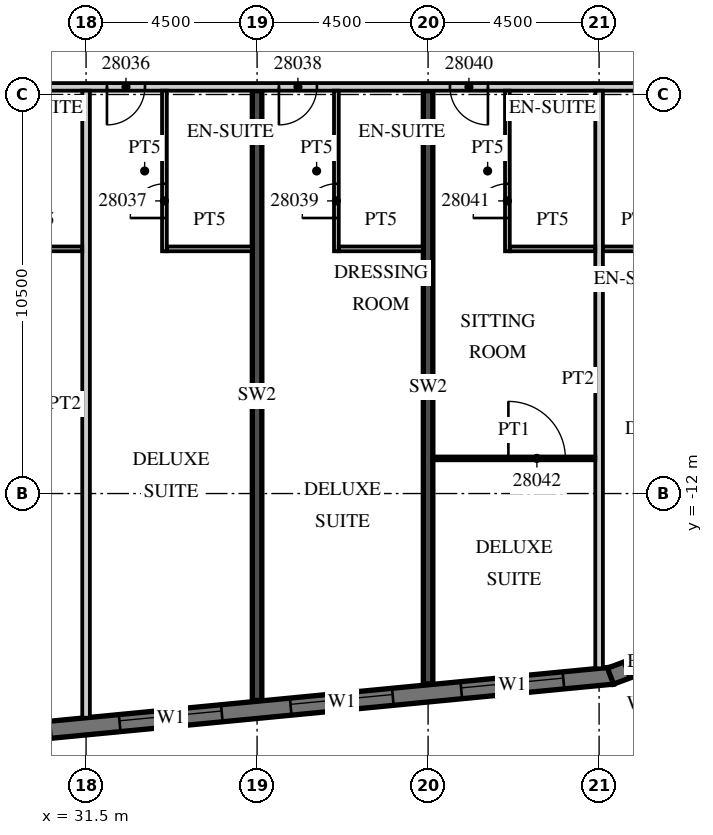
"""IFC4 building model, lengths in metres.
Left out: names, types, materials, properties, quantities, classifications, styles, units other than length and angle.
Written with IfcOpenShell. Run it as: python <this file> out.ifc"""

import sys

from ifc_helpers import new_model, si_unit, direction, frame, frame_2d, origin, place, context, subcontext, project, spatial, polyline, rectangle, outline, extrude, element, fill, save


model = new_model("IFC4")
c1 = context("Model", 3, precision=1e-05, world=origin(), true_north=direction((0.0, 1.0)))
c2 = subcontext(c1, "Body", "Model", "MODEL_VIEW")
j1 = project(units=[si_unit("LENGTHUNIT", "METRE"), si_unit("PLANEANGLEUNIT", "RADIAN")], contexts=[c1])
p1 = place(None, origin())
s1 = spatial("IfcSite", under=j1, at=p1, CompositionType="ELEMENT")
p2 = place(p1, origin())
s2 = spatial("IfcBuilding", under=s1, at=p2, CompositionType="ELEMENT")
p3 = place(p2, frame((0.0, 0.0, 127.3)))
s3 = spatial("IfcBuildingStorey", under=s2, at=p3, CompositionType="ELEMENT", Elevation=127.3)
p4 = place(p3, frame((36.0, -17.444, 0.0), z_axis=(0.0, 0.0, 1.0), x_axis=(0.0, 1.0, 0.0)))
e1 = element("IfcWall", 1, at=p4, inside=s3, PredefinedType="SHEAR", context=c2, shape_type="SweptSolid", body=[
    extrude(rectangle(XDim=16.044, YDim=0.25, at=frame_2d((8.022, 0.0))), origin(), (0.0, 0.0, 1.0), 3.3),
])
p5 = place(p3, frame((40.5, -17.011, 0.0), z_axis=(0.0, 0.0, 1.0), x_axis=(0.0, 1.0, 0.0)))
e2 = element("IfcWall", 2, at=p5, inside=s3, PredefinedType="SHEAR", context=c2, shape_type="SweptSolid", body=[
    extrude(rectangle(XDim=15.611, YDim=0.25, at=frame_2d((7.805, 0.0))), origin(), (0.0, 0.0, 1.0), 3.3),
])
p6 = place(p3, frame((-13.521, -22.46, 0.0), z_axis=(0.0, 0.0, 1.0), x_axis=(0.995396096335, 0.095846812164, 0.0)))
e3 = element("IfcWall", 3, at=p6, inside=s3, PredefinedType="SOLIDWALL", context=c2, shape_type="SweptSolid", body=[
    extrude(rectangle(XDim=59.151, YDim=0.45, at=frame_2d((29.575, 0.0))), origin(), (0.0, 0.0, 1.0), 3.02),
])
p7 = place(p6, frame((0.91, 0.0, 0.45)))
e4 = element("IfcOpeningElement", 4, at=p7, cuts=e3, PredefinedType="OPENING", context=c2, shape_type="SweptSolid", body=[
    extrude(rectangle(XDim=2.7, YDim=2.25, at=frame_2d((1.35, 1.125))), frame((0.0, 0.235, 0.0), z_axis=(0.0, -1.0, 0.0), x_axis=(1.0, 0.0, 0.0)), (0.0, 0.0, 1.0), 0.47),
])
p8 = place(p6, frame((5.431, 0.0, 0.45)))
e5 = element("IfcOpeningElement", 5, at=p8, cuts=e3, PredefinedType="OPENING", context=c2, shape_type="SweptSolid", body=[
    extrude(rectangle(XDim=2.7, YDim=2.25, at=frame_2d((1.35, 1.125))), frame((0.0, 0.235, 0.0), z_axis=(0.0, -1.0, 0.0), x_axis=(1.0, 0.0, 0.0)), (0.0, 0.0, 1.0), 0.47),
])
p9 = place(p6, frame((9.952, 0.0, 0.45)))
e6 = element("IfcOpeningElement", 6, at=p9, cuts=e3, PredefinedType="OPENING", context=c2, shape_type="SweptSolid", body=[
    extrude(rectangle(XDim=2.7, YDim=2.25, at=frame_2d((1.35, 1.125))), frame((0.0, 0.235, 0.0), z_axis=(0.0, -1.0, 0.0), x_axis=(1.0, 0.0, 0.0)), (0.0, 0.0, 1.0), 0.47),
])
p10 = place(p6, frame((14.473, 0.0, 0.45)))
e7 = element("IfcOpeningElement", 7, at=p10, cuts=e3, PredefinedType="OPENING", context=c2, shape_type="SweptSolid", body=[
    extrude(rectangle(XDim=2.7, YDim=2.25, at=frame_2d((1.35, 1.125))), frame((0.0, 0.235, 0.0), z_axis=(0.0, -1.0, 0.0), x_axis=(1.0, 0.0, 0.0)), (0.0, 0.0, 1.0), 0.47),
])
p11 = place(p6, frame((18.994, 0.0, 0.45)))
e8 = element("IfcOpeningElement", 8, at=p11, cuts=e3, PredefinedType="OPENING", context=c2, shape_type="SweptSolid", body=[
    extrude(rectangle(XDim=2.7, YDim=2.25, at=frame_2d((1.35, 1.125))), frame((0.0, 0.235, 0.0), z_axis=(0.0, -1.0, 0.0), x_axis=(1.0, 0.0, 0.0)), (0.0, 0.0, 1.0), 0.47),
])
p12 = place(p6, frame((23.514, 0.0, 0.45)))
e9 = element("IfcOpeningElement", 9, at=p12, cuts=e3, PredefinedType="OPENING", context=c2, shape_type="SweptSolid", body=[
    extrude(rectangle(XDim=2.7, YDim=2.25, at=frame_2d((1.35, 1.125))), frame((0.0, 0.235, 0.0), z_axis=(0.0, -1.0, 0.0), x_axis=(1.0, 0.0, 0.0)), (0.0, 0.0, 1.0), 0.47),
])
p13 = place(p6, frame((28.035, 0.0, 0.45)))
e10 = element("IfcOpeningElement", 10, at=p13, cuts=e3, PredefinedType="OPENING", context=c2, shape_type="SweptSolid", body=[
    extrude(rectangle(XDim=2.7, YDim=2.25, at=frame_2d((1.35, 1.125))), frame((0.0, 0.235, 0.0), z_axis=(0.0, -1.0, 0.0), x_axis=(1.0, 0.0, 0.0)), (0.0, 0.0, 1.0), 0.47),
])
p14 = place(p6, frame((32.556, 0.0, 0.45)))
e11 = element("IfcOpeningElement", 11, at=p14, cuts=e3, PredefinedType="OPENING", context=c2, shape_type="SweptSolid", body=[
    extrude(rectangle(XDim=2.7, YDim=2.25, at=frame_2d((1.35, 1.125))), frame((0.0, 0.235, 0.0), z_axis=(0.0, -1.0, 0.0), x_axis=(1.0, 0.0, 0.0)), (0.0, 0.0, 1.0), 0.47),
])
p15 = place(p6, frame((37.077, 0.0, 0.45)))
e12 = element("IfcOpeningElement", 12, at=p15, cuts=e3, PredefinedType="OPENING", context=c2, shape_type="SweptSolid", body=[
    extrude(rectangle(XDim=2.7, YDim=2.25, at=frame_2d((1.35, 1.125))), frame((0.0, 0.235, 0.0), z_axis=(0.0, -1.0, 0.0), x_axis=(1.0, 0.0, 0.0)), (0.0, 0.0, 1.0), 0.47),
])
p16 = place(p6, frame((41.598, 0.0, 0.45)))
e13 = element("IfcOpeningElement", 13, at=p16, cuts=e3, PredefinedType="OPENING", context=c2, shape_type="SweptSolid", body=[
    extrude(rectangle(XDim=2.7, YDim=2.25, at=frame_2d((1.35, 1.125))), frame((0.0, 0.235, 0.0), z_axis=(0.0, -1.0, 0.0), x_axis=(1.0, 0.0, 0.0)), (0.0, 0.0, 1.0), 0.47),
])
p17 = place(p6, frame((46.118, 0.0, 0.45)))
e14 = element("IfcOpeningElement", 14, at=p17, cuts=e3, PredefinedType="OPENING", context=c2, shape_type="SweptSolid", body=[
    extrude(rectangle(XDim=2.7, YDim=2.25, at=frame_2d((1.35, 1.125))), frame((0.0, 0.235, 0.0), z_axis=(0.0, -1.0, 0.0), x_axis=(1.0, 0.0, 0.0)), (0.0, 0.0, 1.0), 0.47),
])
p18 = place(p6, frame((50.639, 0.0, 0.45)))
e15 = element("IfcOpeningElement", 15, at=p18, cuts=e3, PredefinedType="OPENING", context=c2, shape_type="SweptSolid", body=[
    extrude(rectangle(XDim=2.7, YDim=2.25, at=frame_2d((1.35, 1.125))), frame((0.0, 0.235, 0.0), z_axis=(0.0, -1.0, 0.0), x_axis=(1.0, 0.0, 0.0)), (0.0, 0.0, 1.0), 0.47),
])
p19 = place(p6, frame((55.15, 0.0, 0.45)))
e16 = element("IfcOpeningElement", 16, at=p19, cuts=e3, PredefinedType="OPENING", context=c2, shape_type="SweptSolid", body=[
    extrude(rectangle(XDim=2.7, YDim=2.25, at=frame_2d((1.35, 1.125))), frame((0.0, 0.235, 0.0), z_axis=(0.0, -1.0, 0.0), x_axis=(1.0, 0.0, 0.0)), (0.0, 0.0, 1.0), 0.47),
])
p20 = place(p3, frame((45.3, -16.804, 0.0), z_axis=(0.0, 0.0, 1.0), x_axis=(0.936677599948, 0.350192909346, 0.0)))
e17 = element("IfcWall", 17, at=p20, inside=s3, PredefinedType="SOLIDWALL", context=c2, shape_type="SweptSolid", body=[
    extrude(outline(polyline([(0.0, -0.225), (2.071, -0.225), (1.95, 0.225), (0.121, 0.225), (0.0, -0.225)])), origin(), (0.0, 0.0, 1.0), 3.02),
])
p21 = place(p20, frame((0.435, 0.0, 0.45)))
e18 = element("IfcOpeningElement", 18, at=p21, cuts=e17, PredefinedType="OPENING", context=c2, shape_type="SweptSolid", body=[
    extrude(rectangle(XDim=1.2, YDim=2.25, at=frame_2d((0.6, 1.125))), frame((0.0, 0.235, 0.0), z_axis=(0.0, -1.0, 0.0), x_axis=(1.0, 0.0, 0.0)), (0.0, 0.0, 1.0), 0.47),
])
p22 = place(p3, frame((48.753, -12.672, 0.0), z_axis=(0.0, 0.0, 1.0), x_axis=(-0.095842661909, 0.995396495954, 0.0)))
e19 = element("IfcWall", 19, at=p22, inside=s3, PredefinedType="SOLIDWALL", context=c2, shape_type="SweptSolid", body=[
    extrude(rectangle(XDim=35.0, YDim=0.45, at=frame_2d((17.5, 0.0))), origin(), (0.0, 0.0, 1.0), 3.02),
])
p23 = place(p22, frame((3.072, 0.0, 0.45)))
e20 = element("IfcOpeningElement", 20, at=p23, cuts=e19, PredefinedType="OPENING", context=c2, shape_type="SweptSolid", body=[
    extrude(rectangle(XDim=3.3, YDim=2.25, at=frame_2d((1.65, 1.125))), frame((0.0, 0.235, 0.0), z_axis=(0.0, -1.0, 0.0), x_axis=(1.0, 0.0, 0.0)), (0.0, 0.0, 1.0), 0.47),
])
p24 = place(p22, frame((7.593, 0.0, 0.45)))
e21 = element("IfcOpeningElement", 21, at=p24, cuts=e19, PredefinedType="OPENING", context=c2, shape_type="SweptSolid", body=[
    extrude(rectangle(XDim=3.3, YDim=2.25, at=frame_2d((1.65, 1.125))), frame((0.0, 0.235, 0.0), z_axis=(0.0, -1.0, 0.0), x_axis=(1.0, 0.0, 0.0)), (0.0, 0.0, 1.0), 0.47),
])
p25 = place(p3, frame((-13.5, -1.3, 0.0), z_axis=(0.0, 0.0, 1.0), x_axis=(1.0, 0.0, 0.0)))
e22 = element("IfcWall", 22, at=p25, inside=s3, PredefinedType="PARTITIONING", context=c2, shape_type="SweptSolid", body=[
    extrude(rectangle(XDim=60.932, YDim=0.2, at=frame_2d((30.466, 0.0))), origin(), (0.0, 0.0, 1.0), 3.02),
])
p26 = place(p25, frame((2.925, 0.0, 0.0)))
e23 = element("IfcOpeningElement", 23, at=p26, cuts=e22, PredefinedType="OPENING", context=c2, shape_type="SweptSolid", body=[
    extrude(rectangle(XDim=1.0, YDim=2.1, at=frame_2d((0.5, 1.05))), frame((0.0, 0.11, 0.0), z_axis=(0.0, -1.0, 0.0), x_axis=(1.0, 0.0, 0.0)), (0.0, 0.0, 1.0), 0.22),
])
p27 = place(p25, frame((9.863, 0.0, 0.0)))
e24 = element("IfcOpeningElement", 24, at=p27, cuts=e22, PredefinedType="OPENING", context=c2, shape_type="SweptSolid", body=[
    extrude(rectangle(XDim=1.2, YDim=2.1, at=frame_2d((0.6, 1.05))), frame((0.0, 0.11, 0.0), z_axis=(0.0, -1.0, 0.0), x_axis=(1.0, 0.0, 0.0)), (0.0, 0.0, 1.0), 0.22),
])
p28 = place(p25, frame((15.938, 0.0, 0.0)))
e25 = element("IfcOpeningElement", 25, at=p28, cuts=e22, PredefinedType="OPENING", context=c2, shape_type="SweptSolid", body=[
    extrude(rectangle(XDim=1.2, YDim=2.1, at=frame_2d((0.6, 1.05))), frame((0.0, 0.11, 0.0), z_axis=(0.0, -1.0, 0.0), x_axis=(1.0, 0.0, 0.0)), (0.0, 0.0, 1.0), 0.22),
])
p29 = place(p25, frame((27.862, 0.0, 0.0)))
e26 = element("IfcOpeningElement", 26, at=p29, cuts=e22, PredefinedType="OPENING", context=c2, shape_type="SweptSolid", body=[
    extrude(rectangle(XDim=1.2, YDim=2.1, at=frame_2d((0.6, 1.05))), frame((0.0, 0.11, 0.0), z_axis=(0.0, -1.0, 0.0), x_axis=(1.0, 0.0, 0.0)), (0.0, 0.0, 1.0), 0.22),
])
p30 = place(p25, frame((34.45, 0.0, 0.0)))
e27 = element("IfcOpeningElement", 27, at=p30, cuts=e22, PredefinedType="OPENING", context=c2, shape_type="SweptSolid", body=[
    extrude(rectangle(XDim=1.0, YDim=2.1, at=frame_2d((0.5, 1.05))), frame((0.0, 0.11, 0.0), z_axis=(0.0, -1.0, 0.0), x_axis=(1.0, 0.0, 0.0)), (0.0, 0.0, 1.0), 0.22),
])
p31 = place(p25, frame((36.55, 0.0, 0.0)))
e28 = element("IfcOpeningElement", 28, at=p31, cuts=e22, PredefinedType="OPENING", context=c2, shape_type="SweptSolid", body=[
    extrude(rectangle(XDim=1.0, YDim=2.1, at=frame_2d((0.5, 1.05))), frame((0.0, 0.11, 0.0), z_axis=(0.0, -1.0, 0.0), x_axis=(1.0, 0.0, 0.0)), (0.0, 0.0, 1.0), 0.22),
])
p32 = place(p25, frame((41.075, 0.0, 0.0)))
e29 = element("IfcOpeningElement", 29, at=p32, cuts=e22, PredefinedType="OPENING", context=c2, shape_type="SweptSolid", body=[
    extrude(rectangle(XDim=1.0, YDim=2.1, at=frame_2d((0.5, 1.05))), frame((0.0, 0.11, 0.0), z_axis=(0.0, -1.0, 0.0), x_axis=(1.0, 0.0, 0.0)), (0.0, 0.0, 1.0), 0.22),
])
p33 = place(p25, frame((45.55, 0.0, 0.0)))
e30 = element("IfcOpeningElement", 30, at=p33, cuts=e22, PredefinedType="OPENING", context=c2, shape_type="SweptSolid", body=[
    extrude(rectangle(XDim=1.0, YDim=2.1, at=frame_2d((0.5, 1.05))), frame((0.0, 0.11, 0.0), z_axis=(0.0, -1.0, 0.0), x_axis=(1.0, 0.0, 0.0)), (0.0, 0.0, 1.0), 0.22),
])
p34 = place(p25, frame((50.075, 0.0, 0.0)))
e31 = element("IfcOpeningElement", 31, at=p34, cuts=e22, PredefinedType="OPENING", context=c2, shape_type="SweptSolid", body=[
    extrude(rectangle(XDim=1.0, YDim=2.1, at=frame_2d((0.5, 1.05))), frame((0.0, 0.11, 0.0), z_axis=(0.0, -1.0, 0.0), x_axis=(1.0, 0.0, 0.0)), (0.0, 0.0, 1.0), 0.22),
])
p35 = place(p25, frame((54.575, 0.0, 0.0)))
e32 = element("IfcOpeningElement", 32, at=p35, cuts=e22, PredefinedType="OPENING", context=c2, shape_type="SweptSolid", body=[
    extrude(rectangle(XDim=1.0, YDim=2.1, at=frame_2d((0.5, 1.05))), frame((0.0, 0.11, 0.0), z_axis=(0.0, -1.0, 0.0), x_axis=(1.0, 0.0, 0.0)), (0.0, 0.0, 1.0), 0.22),
])
p36 = place(p25, frame((59.882, 0.0, 0.0)))
e33 = element("IfcOpeningElement", 33, at=p36, cuts=e22, PredefinedType="OPENING", context=c2, shape_type="SweptSolid", body=[
    extrude(rectangle(XDim=0.9, YDim=2.1, at=frame_2d((0.45, 1.05))), frame((0.0, 0.11, 0.0), z_axis=(0.0, -1.0, 0.0), x_axis=(1.0, 0.0, 0.0)), (0.0, 0.0, 1.0), 0.22),
])
p37 = place(p3, frame((31.5, -17.899, 0.0), z_axis=(0.0, 0.0, 1.0), x_axis=(0.0, 1.0, 0.0)))
e34 = element("IfcWall", 34, at=p37, inside=s3, PredefinedType="PARTITIONING", context=c2, shape_type="SweptSolid", body=[
    extrude(rectangle(XDim=16.499, YDim=0.2, at=frame_2d((8.25, 0.0))), origin(), (0.0, 0.0, 1.0), 3.02),
])
p38 = place(p3, frame((29.15, -5.562, 0.0), z_axis=(0.0, 0.0, 1.0), x_axis=(1.0, 0.0, 0.0)))
e35 = element("IfcWall", 35, at=p38, inside=s3, PredefinedType="PARTITIONING", context=c2, shape_type="SweptSolid", body=[
    extrude(rectangle(XDim=2.25, YDim=0.125, at=frame_2d((1.125, 0.0))), origin(), (0.0, 0.0, 1.0), 3.02),
])
p39 = place(p3, frame((33.562, -5.625, 0.0), z_axis=(0.0, 0.0, 1.0), x_axis=(0.0, 1.0, 0.0)))
e36 = element("IfcWall", 36, at=p39, inside=s3, PredefinedType="PARTITIONING", context=c2, shape_type="SweptSolid", body=[
    extrude(rectangle(XDim=4.225, YDim=0.125, at=frame_2d((2.113, 0.0))), origin(), (0.0, 0.0, 1.0), 3.02),
])
p40 = place(p39, frame((0.875, 0.0, 0.0)))
e37 = element("IfcOpeningElement", 37, at=p40, cuts=e36, PredefinedType="OPENING", context=c2, shape_type="SweptSolid", body=[
    extrude(rectangle(XDim=0.9, YDim=2.1, at=frame_2d((0.45, 1.05))), frame((0.0, 0.073, 0.0), z_axis=(0.0, -1.0, 0.0), x_axis=(1.0, 0.0, 0.0)), (0.0, 0.0, 1.0), 0.145),
])
p41 = place(p3, frame((33.625, -5.562, 0.0), z_axis=(0.0, 0.0, 1.0), x_axis=(1.0, 0.0, 0.0)))
e38 = element("IfcWall", 38, at=p41, inside=s3, PredefinedType="PARTITIONING", context=c2, shape_type="SweptSolid", body=[
    extrude(rectangle(XDim=2.25, YDim=0.125, at=frame_2d((1.125, 0.0))), origin(), (0.0, 0.0, 1.0), 3.02),
])
p42 = place(p3, frame((38.087, -5.625, 0.0), z_axis=(0.0, 0.0, 1.0), x_axis=(0.0, 1.0, 0.0)))
e39 = element("IfcWall", 39, at=p42, inside=s3, PredefinedType="PARTITIONING", context=c2, shape_type="SweptSolid", body=[
    extrude(rectangle(XDim=4.225, YDim=0.125, at=frame_2d((2.113, 0.0))), origin(), (0.0, 0.0, 1.0), 3.02),
])
p43 = place(p42, frame((0.875, 0.0, 0.0)))
e40 = element("IfcOpeningElement", 40, at=p43, cuts=e39, PredefinedType="OPENING", context=c2, shape_type="SweptSolid", body=[
    extrude(rectangle(XDim=0.9, YDim=2.1, at=frame_2d((0.45, 1.05))), frame((0.0, 0.073, 0.0), z_axis=(0.0, -1.0, 0.0), x_axis=(1.0, 0.0, 0.0)), (0.0, 0.0, 1.0), 0.145),
])
p44 = place(p3, frame((38.15, -5.562, 0.0), z_axis=(0.0, 0.0, 1.0), x_axis=(1.0, 0.0, 0.0)))
e41 = element("IfcWall", 41, at=p44, inside=s3, PredefinedType="PARTITIONING", context=c2, shape_type="SweptSolid", body=[
    extrude(rectangle(XDim=2.225, YDim=0.125, at=frame_2d((1.113, 0.0))), origin(), (0.0, 0.0, 1.0), 3.02),
])
p45 = place(p3, frame((45.0, -16.599, 0.0), z_axis=(0.0, 0.0, 1.0), x_axis=(0.0, 1.0, 0.0)))
e42 = element("IfcWall", 42, at=p45, inside=s3, PredefinedType="PARTITIONING", context=c2, shape_type="SweptSolid", body=[
    extrude(rectangle(XDim=15.199, YDim=0.2, at=frame_2d((7.6, 0.0))), origin(), (0.0, 0.0, 1.0), 3.02),
])
p46 = place(p3, frame((42.587, -5.625, 0.0), z_axis=(0.0, 0.0, 1.0), x_axis=(0.0, 1.0, 0.0)))
e43 = element("IfcWall", 43, at=p46, inside=s3, PredefinedType="PARTITIONING", context=c2, shape_type="SweptSolid", body=[
    extrude(rectangle(XDim=4.225, YDim=0.125, at=frame_2d((2.113, 0.0))), origin(), (0.0, 0.0, 1.0), 3.02),
])
p47 = place(p46, frame((0.875, 0.0, 0.0)))
e44 = element("IfcOpeningElement", 44, at=p47, cuts=e43, PredefinedType="OPENING", context=c2, shape_type="SweptSolid", body=[
    extrude(rectangle(XDim=0.9, YDim=2.1, at=frame_2d((0.45, 1.05))), frame((0.0, 0.073, 0.0), z_axis=(0.0, -1.0, 0.0), x_axis=(1.0, 0.0, 0.0)), (0.0, 0.0, 1.0), 0.145),
])
p48 = place(p3, frame((42.65, -5.562, 0.0), z_axis=(0.0, 0.0, 1.0), x_axis=(1.0, 0.0, 0.0)))
e45 = element("IfcWall", 45, at=p48, inside=s3, PredefinedType="PARTITIONING", context=c2, shape_type="SweptSolid", body=[
    extrude(rectangle(XDim=2.25, YDim=0.125, at=frame_2d((1.125, 0.0))), origin(), (0.0, 0.0, 1.0), 3.02),
])
p49 = place(p3, frame((40.625, -11.075, 0.0), z_axis=(0.0, 0.0, 1.0), x_axis=(1.0, 0.0, 0.0)))
e46 = element("IfcWall", 46, at=p49, inside=s3, PredefinedType="PARTITIONING", context=c2, shape_type="SweptSolid", body=[
    extrude(rectangle(XDim=4.275, YDim=0.1, at=frame_2d((2.137, 0.0))), origin(), (0.0, 0.0, 1.0), 3.02),
])
p50 = place(p49, frame((1.988, 0.0, 0.0)))
e47 = element("IfcOpeningElement", 47, at=p50, cuts=e46, PredefinedType="OPENING", context=c2, shape_type="SweptSolid", body=[
    extrude(rectangle(XDim=1.5, YDim=2.1, at=frame_2d((0.75, 1.05))), frame((0.0, 0.06, 0.0), z_axis=(0.0, -1.0, 0.0), x_axis=(1.0, 0.0, 0.0)), (0.0, 0.0, 1.0), 0.12),
])
p51 = place(p3, frame((45.1, -5.562, 0.0), z_axis=(0.0, 0.0, 1.0), x_axis=(1.0, 0.0, 0.0)))
e48 = element("IfcWall", 48, at=p51, inside=s3, PredefinedType="PARTITIONING", context=c2, shape_type="SweptSolid", body=[
    extrude(rectangle(XDim=1.8, YDim=0.125, at=frame_2d((0.9, 0.0))), origin(), (0.0, 0.0, 1.0), 3.02),
])
p52 = place(p17, origin())
e49 = element("IfcWindow", 49, at=p52, inside=s3, PartitioningType="SINGLE_PANEL", PredefinedType="WINDOW", context=c2, shape_type="SweptSolid", body=[
    extrude(rectangle(XDim=2.7, YDim=2.25, at=frame_2d((1.35, 1.125))), frame((0.0, 0.09, 0.0), z_axis=(0.0, -1.0, 0.0), x_axis=(1.0, 0.0, 0.0)), (0.0, 0.0, 1.0), 0.06),
])
fill(e14, e49)
p53 = place(p18, origin())
e50 = element("IfcWindow", 50, at=p53, inside=s3, PartitioningType="SINGLE_PANEL", PredefinedType="WINDOW", context=c2, shape_type="SweptSolid", body=[
    extrude(rectangle(XDim=2.7, YDim=2.25, at=frame_2d((1.35, 1.125))), frame((0.0, 0.09, 0.0), z_axis=(0.0, -1.0, 0.0), x_axis=(1.0, 0.0, 0.0)), (0.0, 0.0, 1.0), 0.06),
])
fill(e15, e50)
p54 = place(p19, origin())
e51 = element("IfcWindow", 51, at=p54, inside=s3, PartitioningType="SINGLE_PANEL", PredefinedType="WINDOW", context=c2, shape_type="SweptSolid", body=[
    extrude(rectangle(XDim=2.7, YDim=2.25, at=frame_2d((1.35, 1.125))), frame((0.0, 0.09, 0.0), z_axis=(0.0, -1.0, 0.0), x_axis=(1.0, 0.0, 0.0)), (0.0, 0.0, 1.0), 0.06),
])
fill(e16, e51)
p55 = place(p21, origin())
e52 = element("IfcWindow", 52, at=p55, inside=s3, PartitioningType="SINGLE_PANEL", PredefinedType="WINDOW", context=c2, shape_type="SweptSolid", body=[
    extrude(rectangle(XDim=1.2, YDim=2.25, at=frame_2d((0.6, 1.125))), frame((0.0, 0.09, 0.0), z_axis=(0.0, -1.0, 0.0), x_axis=(1.0, 0.0, 0.0)), (0.0, 0.0, 1.0), 0.06),
])
fill(e18, e52)
p56 = place(p33, origin())
e53 = element("IfcDoor", 53, at=p56, inside=s3, OperationType="SINGLE_SWING_LEFT", PredefinedType="DOOR", context=c2, shape_type="SweptSolid", body=[
    extrude(rectangle(XDim=1.0, YDim=2.1, at=frame_2d((0.5, 1.05))), frame((0.0, 0.025, 0.0), z_axis=(0.0, -1.0, 0.0), x_axis=(1.0, 0.0, 0.0)), (0.0, 0.0, 1.0), 0.05),
])
fill(e30, e53)
p57 = place(p40, origin())
e54 = element("IfcDoor", 54, at=p57, inside=s3, OperationType="SINGLE_SWING_LEFT", PredefinedType="DOOR", context=c2, shape_type="SweptSolid", body=[
    extrude(rectangle(XDim=0.9, YDim=2.1, at=frame_2d((0.45, 1.05))), frame((0.0, 0.025, 0.0), z_axis=(0.0, -1.0, 0.0), x_axis=(1.0, 0.0, 0.0)), (0.0, 0.0, 1.0), 0.05),
])
fill(e37, e54)
p58 = place(p34, origin())
e55 = element("IfcDoor", 55, at=p58, inside=s3, OperationType="SINGLE_SWING_LEFT", PredefinedType="DOOR", context=c2, shape_type="SweptSolid", body=[
    extrude(rectangle(XDim=1.0, YDim=2.1, at=frame_2d((0.5, 1.05))), frame((0.0, 0.025, 0.0), z_axis=(0.0, -1.0, 0.0), x_axis=(1.0, 0.0, 0.0)), (0.0, 0.0, 1.0), 0.05),
])
fill(e31, e55)
p59 = place(p43, origin())
e56 = element("IfcDoor", 56, at=p59, inside=s3, OperationType="SINGLE_SWING_LEFT", PredefinedType="DOOR", context=c2, shape_type="SweptSolid", body=[
    extrude(rectangle(XDim=0.9, YDim=2.1, at=frame_2d((0.45, 1.05))), frame((0.0, 0.025, 0.0), z_axis=(0.0, -1.0, 0.0), x_axis=(1.0, 0.0, 0.0)), (0.0, 0.0, 1.0), 0.05),
])
fill(e40, e56)
p60 = place(p35, origin())
e57 = element("IfcDoor", 57, at=p60, inside=s3, OperationType="SINGLE_SWING_RIGHT", PredefinedType="DOOR", context=c2, shape_type="SweptSolid", body=[
    extrude(rectangle(XDim=1.0, YDim=2.1, at=frame_2d((0.5, 1.05))), frame((0.0, 0.025, 0.0), z_axis=(0.0, -1.0, 0.0), x_axis=(1.0, 0.0, 0.0)), (0.0, 0.0, 1.0), 0.05),
])
fill(e32, e57)
p61 = place(p47, origin())
e58 = element("IfcDoor", 58, at=p61, inside=s3, OperationType="SINGLE_SWING_LEFT", PredefinedType="DOOR", context=c2, shape_type="SweptSolid", body=[
    extrude(rectangle(XDim=0.9, YDim=2.1, at=frame_2d((0.45, 1.05))), frame((0.0, 0.025, 0.0), z_axis=(0.0, -1.0, 0.0), x_axis=(1.0, 0.0, 0.0)), (0.0, 0.0, 1.0), 0.05),
])
fill(e44, e58)
p62 = place(p50, origin())
e59 = element("IfcDoor", 59, at=p62, inside=s3, OperationType="SINGLE_SWING_LEFT", PredefinedType="DOOR", context=c2, shape_type="SweptSolid", body=[
    extrude(rectangle(XDim=1.5, YDim=2.1, at=frame_2d((0.75, 1.05))), frame((0.0, 0.025, 0.0), z_axis=(0.0, -1.0, 0.0), x_axis=(1.0, 0.0, 0.0)), (0.0, 0.0, 1.0), 0.05),
])
fill(e47, e59)
save(model, sys.argv[1])
